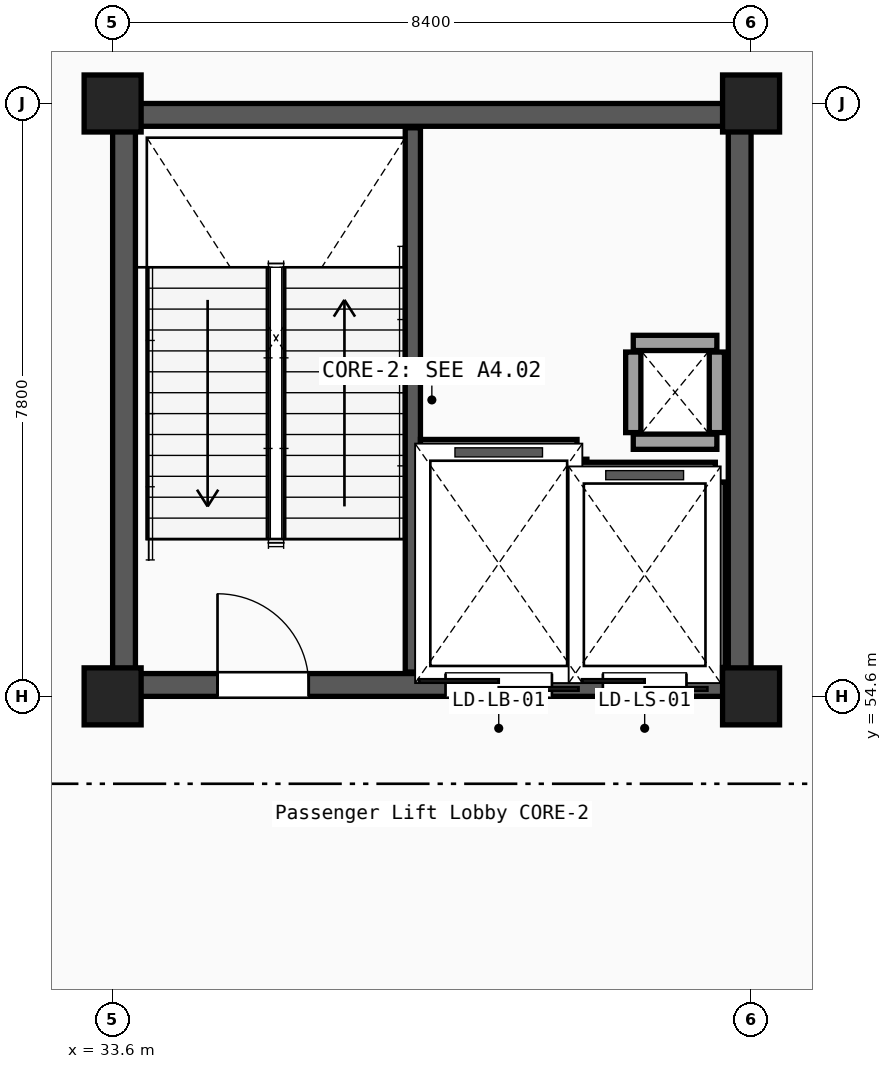
"""IFC4 building model, lengths in metres.
Left out: names, types, materials, properties, quantities, classifications, styles, units other than length and angle.
Written with IfcOpenShell. Run it as: python <this file> out.ifc"""

import sys

from ifc_helpers import new_model, si_unit, direction, frame, frame_2d, origin, origin_2d, place, context, subcontext, project, spatial, rectangle, extrude, element, fill, save


model = new_model("IFC4")
c1 = context("Model", 3, precision=1e-05, world=origin(), true_north=direction((0.0, 1.0)))
c2 = subcontext(c1, "Body", "Model", "MODEL_VIEW")
j1 = project(units=[si_unit("LENGTHUNIT", "METRE"), si_unit("PLANEANGLEUNIT", "RADIAN")], contexts=[c1])
p1 = place(None, origin())
s1 = spatial("IfcSite", under=j1, at=p1, CompositionType="ELEMENT")
p2 = place(p1, origin())
s2 = spatial("IfcBuilding", under=s1, at=p2, CompositionType="ELEMENT")
p3 = place(p2, origin())
s3 = spatial("IfcBuildingStorey", under=s2, at=p3, CompositionType="ELEMENT", Elevation=0.0)
for number, where, z_axis, x_axis in (
    (1, (33.6, 54.6, 0.0), (0.0, 0.0, 1.0), (1.0, 0.0, 0.0)),
    (2, (33.6, 62.4, 0.0), (0.0, 0.0, 1.0), (1.0, 0.0, 0.0)),
    (3, (42.0, 54.6, 0.0), (0.0, 0.0, 1.0), (1.0, 0.0, 0.0)),
    (4, (42.0, 62.4, 0.0), (0.0, 0.0, 1.0), (1.0, 0.0, 0.0)),
):
    element("IfcColumn", number, at=place(p3, frame(where, z_axis=z_axis, x_axis=x_axis)), inside=s3, PredefinedType="COLUMN", context=c2, shape_type="SweptSolid", body=[
        extrude(rectangle(XDim=0.75, YDim=0.75, at=origin_2d()), origin(), (0.0, 0.0, 1.0), 5.1),
    ])
p4 = place(p3, frame((33.6, 54.75, 0.0), z_axis=(0.0, 0.0, 1.0), x_axis=(1.0, 0.0, 0.0)))
e5 = element("IfcWall", 5, at=p4, inside=s3, PredefinedType="SHEAR", context=c2, shape_type="SweptSolid", body=[
    extrude(rectangle(XDim=8.4, YDim=0.3, at=frame_2d((4.2, 0.0))), origin(), (0.0, 0.0, 1.0), 4.83),
])
p5 = place(p4, frame((1.38, 0.0, 0.0)))
e6 = element("IfcOpeningElement", 6, at=p5, cuts=e5, PredefinedType="OPENING", context=c2, shape_type="SweptSolid", body=[
    extrude(rectangle(XDim=1.2, YDim=2.15, at=frame_2d((0.6, 1.075))), frame((0.0, 0.16, 0.0), z_axis=(0.0, -1.0, 0.0), x_axis=(1.0, 0.0, 0.0)), (0.0, 0.0, 1.0), 0.32),
])
p6 = place(p4, frame((4.38, 0.0, 0.0)))
e7 = element("IfcOpeningElement", 7, at=p6, cuts=e5, PredefinedType="OPENING", context=c2, shape_type="SweptSolid", body=[
    extrude(rectangle(XDim=1.4, YDim=2.2, at=frame_2d((0.7, 1.1))), frame((0.0, 0.16, 0.0), z_axis=(0.0, -1.0, 0.0), x_axis=(1.0, 0.0, 0.0)), (0.0, 0.0, 1.0), 0.32),
])
p7 = place(p4, frame((6.45, 0.0, 0.0)))
e8 = element("IfcOpeningElement", 8, at=p7, cuts=e5, PredefinedType="OPENING", context=c2, shape_type="SweptSolid", body=[
    extrude(rectangle(XDim=1.1, YDim=2.15, at=frame_2d((0.55, 1.075))), frame((0.0, 0.16, 0.0), z_axis=(0.0, -1.0, 0.0), x_axis=(1.0, 0.0, 0.0)), (0.0, 0.0, 1.0), 0.32),
])
p8 = place(p3, frame((33.6, 62.25, 0.0), z_axis=(0.0, 0.0, 1.0), x_axis=(1.0, 0.0, 0.0)))
e9 = element("IfcWall", 9, at=p8, inside=s3, PredefinedType="SHEAR", context=c2, shape_type="SweptSolid", body=[
    extrude(rectangle(XDim=8.4, YDim=0.3, at=frame_2d((4.2, 0.0))), origin(), (0.0, 0.0, 1.0), 4.83),
])
for number, where, z_axis, x_axis in (
    (10, (33.75, 54.9, 0.0), (0.0, 0.0, 1.0), (0.0, 1.0, 0.0)),
    (11, (41.85, 54.9, 0.0), (0.0, 0.0, 1.0), (0.0, 1.0, 0.0)),
):
    element("IfcWall", number, at=place(p3, frame(where, z_axis=z_axis, x_axis=x_axis)), inside=s3, PredefinedType="SHEAR", context=c2, shape_type="SweptSolid", body=[
        extrude(rectangle(XDim=7.2, YDim=0.3, at=frame_2d((3.6, 0.0))), origin(), (0.0, 0.0, 1.0), 4.83),
    ])
p9 = place(p3, frame((37.55, 54.92, 0.0), z_axis=(0.0, 0.0, 1.0), x_axis=(0.0, 1.0, 0.0)))
e12 = element("IfcWall", 12, at=p9, inside=s3, PredefinedType="SHEAR", context=c2, shape_type="SweptSolid", body=[
    extrude(rectangle(XDim=7.16, YDim=0.2, at=frame_2d((3.58, 0.0))), origin(), (0.0, 0.0, 1.0), 4.83),
])
for number, where, z_axis, x_axis in (
    (13, (40.45, 57.95, 0.0), (0.0, 0.0, 1.0), (1.0, 0.0, 0.0)),
    (14, (40.45, 59.25, 0.0), (0.0, 0.0, 1.0), (1.0, 0.0, 0.0)),
):
    element("IfcWall", number, at=place(p3, frame(where, z_axis=z_axis, x_axis=x_axis)), inside=s3, PredefinedType="PARTITIONING", context=c2, shape_type="SweptSolid", body=[
        extrude(rectangle(XDim=1.1, YDim=0.2, at=frame_2d((0.55, 0.0))), origin(), (0.0, 0.0, 1.0), 4.21),
    ])
for number, where, z_axis, x_axis in (
    (15, (40.45, 58.07, 0.0), (0.0, 0.0, 1.0), (0.0, 1.0, 0.0)),
    (16, (41.55, 58.07, 0.0), (0.0, 0.0, 1.0), (0.0, 1.0, 0.0)),
):
    element("IfcWall", number, at=place(p3, frame(where, z_axis=z_axis, x_axis=x_axis)), inside=s3, PredefinedType="PARTITIONING", context=c2, shape_type="SweptSolid", body=[
        extrude(rectangle(XDim=1.06, YDim=0.2, at=frame_2d((0.53, 0.0))), origin(), (0.0, 0.0, 1.0), 4.21),
    ])
p10 = place(p3, frame((39.74, 54.98, 0.0), z_axis=(0.0, 0.0, 1.0), x_axis=(0.0, 1.0, 0.0)))
e17 = element("IfcWall", 17, at=p10, inside=s3, PredefinedType="PARTITIONING", context=c2, shape_type="SweptSolid", body=[
    extrude(rectangle(XDim=2.74, YDim=0.2, at=frame_2d((1.37, 0.0))), origin(), (0.0, 0.0, 1.0), 4.21),
])
p11 = place(p3, frame((37.65, 57.88, 0.0), z_axis=(0.0, 0.0, 1.0), x_axis=(1.0, 0.0, 0.0)))
e18 = element("IfcWall", 18, at=p11, inside=s3, PredefinedType="PARTITIONING", context=c2, shape_type="SweptSolid", body=[
    extrude(rectangle(XDim=2.06, YDim=0.2, at=frame_2d((1.03, 0.0))), origin(), (0.0, 0.0, 1.0), 4.21),
])
p12 = place(p3, frame((41.56, 54.98, 0.0), z_axis=(0.0, 0.0, 1.0), x_axis=(0.0, 1.0, 0.0)))
e19 = element("IfcWall", 19, at=p12, inside=s3, PredefinedType="PARTITIONING", context=c2, shape_type="SweptSolid", body=[
    extrude(rectangle(XDim=2.44, YDim=0.2, at=frame_2d((1.22, 0.0))), origin(), (0.0, 0.0, 1.0), 4.21),
])
p13 = place(p3, frame((39.67, 57.58, 0.0), z_axis=(0.0, 0.0, 1.0), x_axis=(1.0, 0.0, 0.0)))
e20 = element("IfcWall", 20, at=p13, inside=s3, PredefinedType="PARTITIONING", context=c2, shape_type="SweptSolid", body=[
    extrude(rectangle(XDim=1.86, YDim=0.2, at=frame_2d((0.93, 0.0))), origin(), (0.0, 0.0, 1.0), 4.21),
])
p14 = place(p5, origin())
e21 = element("IfcDoor", 21, at=p14, inside=s3, OperationType="SINGLE_SWING_LEFT", PredefinedType="DOOR", context=c2, shape_type="SweptSolid", body=[
    extrude(rectangle(XDim=1.2, YDim=2.15, at=frame_2d((0.6, 1.075))), frame((0.0, 0.025, 0.0), z_axis=(0.0, -1.0, 0.0), x_axis=(1.0, 0.0, 0.0)), (0.0, 0.0, 1.0), 0.05),
])
fill(e6, e21)
p15 = place(p6, origin())
e22 = element("IfcDoor", 22, at=p15, inside=s3, OperationType="DOUBLE_DOOR_SLIDING", PredefinedType="DOOR", context=c2, shape_type="SweptSolid", body=[
    extrude(rectangle(XDim=1.4, YDim=2.2, at=frame_2d((0.7, 1.1))), frame((0.0, 0.025, 0.0), z_axis=(0.0, -1.0, 0.0), x_axis=(1.0, 0.0, 0.0)), (0.0, 0.0, 1.0), 0.05),
])
fill(e7, e22)
p16 = place(p7, origin())
e23 = element("IfcDoor", 23, at=p16, inside=s3, OperationType="DOUBLE_DOOR_SLIDING", PredefinedType="DOOR", context=c2, shape_type="SweptSolid", body=[
    extrude(rectangle(XDim=1.1, YDim=2.15, at=frame_2d((0.55, 1.075))), frame((0.0, 0.025, 0.0), z_axis=(0.0, -1.0, 0.0), x_axis=(1.0, 0.0, 0.0)), (0.0, 0.0, 1.0), 0.05),
])
fill(e8, e23)
save(model, sys.argv[1])
